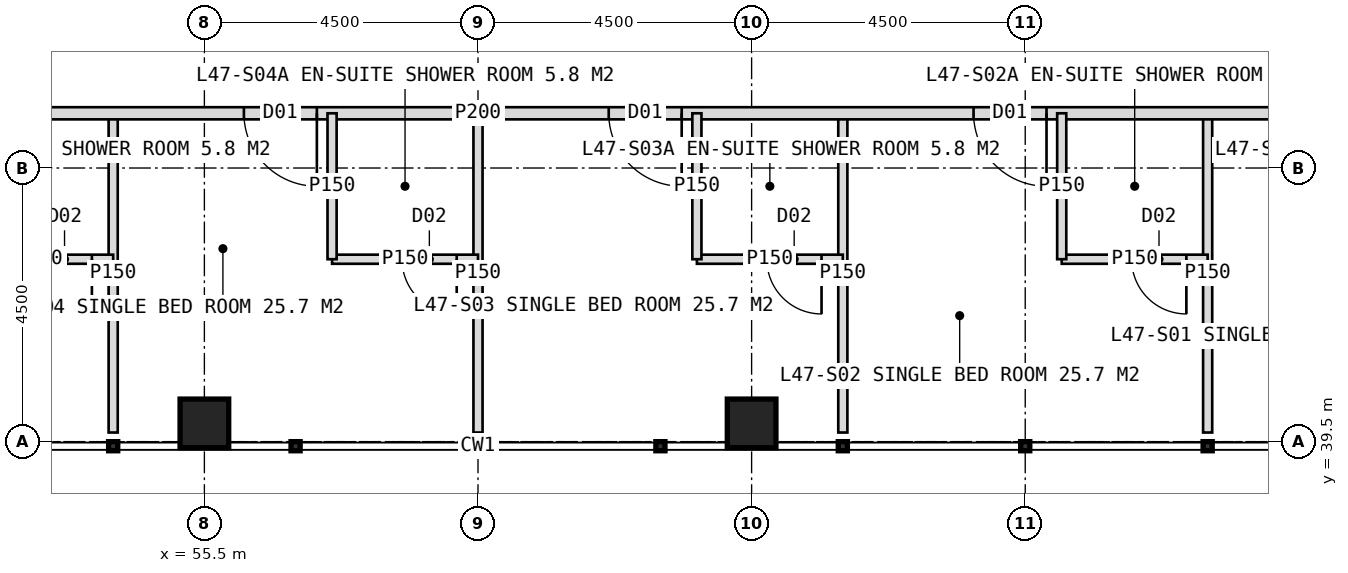
"""IFC4 building model, lengths in metres.
Left out: names, types, materials, properties, quantities, classifications, styles, units other than length and angle.
Written with IfcOpenShell. Run it as: python <this file> out.ifc"""

import sys

from ifc_helpers import new_model, si_unit, direction, frame, frame_2d, origin, origin_2d, place, context, subcontext, project, spatial, rectangle, hollow_rectangle, extrude, element, fill, save


model = new_model("IFC4")
c1 = context("Model", 3, precision=1e-05, world=origin(), true_north=direction((0.0, 1.0)))
c2 = subcontext(c1, "Body", "Model", "MODEL_VIEW")
j1 = project(units=[si_unit("LENGTHUNIT", "METRE"), si_unit("PLANEANGLEUNIT", "RADIAN")], contexts=[c1])
p1 = place(None, origin())
s1 = spatial("IfcSite", under=j1, at=p1, CompositionType="ELEMENT")
p2 = place(p1, origin())
s2 = spatial("IfcBuilding", under=s1, at=p2, CompositionType="ELEMENT")
p3 = place(p2, frame((0.0, 0.0, 197.0)))
s3 = spatial("IfcBuildingStorey", under=s2, at=p3, CompositionType="ELEMENT", Elevation=197.0)
for number, where, z_axis, x_axis in (
    (1, (55.5, 39.8, 0.0), (0.0, 0.0, 1.0), (1.0, 0.0, 0.0)),
    (2, (64.5, 39.8, 0.0), (0.0, 0.0, 1.0), (1.0, 0.0, 0.0)),
):
    element("IfcColumn", number, at=place(p3, frame(where, z_axis=z_axis, x_axis=x_axis)), inside=s3, PredefinedType="COLUMN", context=c2, shape_type="SweptSolid", body=[
        extrude(hollow_rectangle(XDim=0.8, YDim=0.8, WallThickness=0.08, at=origin_2d()), origin(), (0.0, 0.0, 1.0), 4.0),
    ])
for number, where, z_axis, x_axis in (
    (3, (72.0, 44.9, 0.0), (0.0, 0.0, 1.0), (0.0, -1.0, 0.0)),
    (4, (66.0, 44.9, 0.0), (0.0, 0.0, 1.0), (0.0, -1.0, 0.0)),
):
    element("IfcWall", number, at=place(p3, frame(where, z_axis=z_axis, x_axis=x_axis)), inside=s3, PredefinedType="PARTITIONING", context=c2, shape_type="SweptSolid", body=[
        extrude(rectangle(XDim=5.25, YDim=0.15, at=frame_2d((2.625, 0.0))), origin(), (0.0, 0.0, 1.0), 3.75),
    ])
p4 = place(p3, frame((60.0, 44.9, 0.0), z_axis=(0.0, 0.0, 1.0), x_axis=(0.0, -1.0, 0.0)))
e5 = element("IfcWall", 5, at=p4, inside=s3, PredefinedType="PARTITIONING", context=c2, shape_type="SweptSolid", body=[
    extrude(rectangle(XDim=5.25, YDim=0.15, at=frame_2d((2.625, 0.0))), origin(), (0.0, 0.0, 1.0), 2.95),
])
p5 = place(p3, frame((54.0, 44.9, 0.0), z_axis=(0.0, 0.0, 1.0), x_axis=(0.0, -1.0, 0.0)))
e6 = element("IfcWall", 6, at=p5, inside=s3, PredefinedType="PARTITIONING", context=c2, shape_type="SweptSolid", body=[
    extrude(rectangle(XDim=5.25, YDim=0.15, at=frame_2d((2.625, 0.0))), origin(), (0.0, 0.0, 1.0), 3.75),
])
p6 = place(p3, frame((77.1, 44.9, 0.0), z_axis=(0.0, 0.0, 1.0), x_axis=(-1.0, 0.0, 0.0)))
e7 = element("IfcWall", 7, at=p6, inside=s3, PredefinedType="PARTITIONING", context=c2, shape_type="SweptSolid", body=[
    extrude(rectangle(XDim=34.2, YDim=0.2, at=frame_2d((17.1, 0.0))), origin(), (0.0, 0.0, 1.0), 3.75),
])
p7 = place(p6, frame((2.65, 0.0, 0.0)))
e8 = element("IfcOpeningElement", 8, at=p7, cuts=e7, PredefinedType="OPENING", context=c2, shape_type="SweptSolid", body=[
    extrude(rectangle(XDim=1.2, YDim=2.2, at=frame_2d((0.6, 1.1))), frame((0.0, 0.11, 0.0), z_axis=(0.0, -1.0, 0.0), x_axis=(1.0, 0.0, 0.0)), (0.0, 0.0, 1.0), 0.22),
])
p8 = place(p6, frame((7.75, 0.0, 0.0)))
e9 = element("IfcOpeningElement", 9, at=p8, cuts=e7, PredefinedType="OPENING", context=c2, shape_type="SweptSolid", body=[
    extrude(rectangle(XDim=1.2, YDim=2.2, at=frame_2d((0.6, 1.1))), frame((0.0, 0.11, 0.0), z_axis=(0.0, -1.0, 0.0), x_axis=(1.0, 0.0, 0.0)), (0.0, 0.0, 1.0), 0.22),
])
p9 = place(p6, frame((13.75, 0.0, 0.0)))
e10 = element("IfcOpeningElement", 10, at=p9, cuts=e7, PredefinedType="OPENING", context=c2, shape_type="SweptSolid", body=[
    extrude(rectangle(XDim=1.2, YDim=2.2, at=frame_2d((0.6, 1.1))), frame((0.0, 0.11, 0.0), z_axis=(0.0, -1.0, 0.0), x_axis=(1.0, 0.0, 0.0)), (0.0, 0.0, 1.0), 0.22),
])
p10 = place(p6, frame((19.75, 0.0, 0.0)))
e11 = element("IfcOpeningElement", 11, at=p10, cuts=e7, PredefinedType="OPENING", context=c2, shape_type="SweptSolid", body=[
    extrude(rectangle(XDim=1.2, YDim=2.2, at=frame_2d((0.6, 1.1))), frame((0.0, 0.11, 0.0), z_axis=(0.0, -1.0, 0.0), x_axis=(1.0, 0.0, 0.0)), (0.0, 0.0, 1.0), 0.22),
])
p11 = place(p6, frame((25.75, 0.0, 0.0)))
e12 = element("IfcOpeningElement", 12, at=p11, cuts=e7, PredefinedType="OPENING", context=c2, shape_type="SweptSolid", body=[
    extrude(rectangle(XDim=1.2, YDim=2.2, at=frame_2d((0.6, 1.1))), frame((0.0, 0.11, 0.0), z_axis=(0.0, -1.0, 0.0), x_axis=(1.0, 0.0, 0.0)), (0.0, 0.0, 1.0), 0.22),
])
p12 = place(p3, frame((72.0, 42.5, 0.0), z_axis=(0.0, 0.0, 1.0), x_axis=(-1.0, 0.0, 0.0)))
e13 = element("IfcWall", 13, at=p12, inside=s3, PredefinedType="PARTITIONING", context=c2, shape_type="SweptSolid", body=[
    extrude(rectangle(XDim=2.4, YDim=0.15, at=frame_2d((1.2, 0.0))), origin(), (0.0, 0.0, 1.0), 3.75),
])
p13 = place(p12, frame((0.35, 0.0, 0.0)))
e14 = element("IfcOpeningElement", 14, at=p13, cuts=e13, PredefinedType="OPENING", context=c2, shape_type="SweptSolid", body=[
    extrude(rectangle(XDim=0.9, YDim=2.1, at=frame_2d((0.45, 1.05))), frame((0.0, 0.085, 0.0), z_axis=(0.0, -1.0, 0.0), x_axis=(1.0, 0.0, 0.0)), (0.0, 0.0, 1.0), 0.17),
])
p14 = place(p3, frame((69.6, 44.9, 0.0), z_axis=(0.0, 0.0, 1.0), x_axis=(0.0, -1.0, 0.0)))
e15 = element("IfcWall", 15, at=p14, inside=s3, PredefinedType="PARTITIONING", context=c2, shape_type="SweptSolid", body=[
    extrude(rectangle(XDim=2.4, YDim=0.15, at=frame_2d((1.2, 0.0))), origin(), (0.0, 0.0, 1.0), 3.75),
])
p15 = place(p3, frame((66.0, 42.5, 0.0), z_axis=(0.0, 0.0, 1.0), x_axis=(-1.0, 0.0, 0.0)))
e16 = element("IfcWall", 16, at=p15, inside=s3, PredefinedType="PARTITIONING", context=c2, shape_type="SweptSolid", body=[
    extrude(rectangle(XDim=2.4, YDim=0.15, at=frame_2d((1.2, 0.0))), origin(), (0.0, 0.0, 1.0), 3.75),
])
p16 = place(p15, frame((0.35, 0.0, 0.0)))
e17 = element("IfcOpeningElement", 17, at=p16, cuts=e16, PredefinedType="OPENING", context=c2, shape_type="SweptSolid", body=[
    extrude(rectangle(XDim=0.9, YDim=2.1, at=frame_2d((0.45, 1.05))), frame((0.0, 0.085, 0.0), z_axis=(0.0, -1.0, 0.0), x_axis=(1.0, 0.0, 0.0)), (0.0, 0.0, 1.0), 0.17),
])
p17 = place(p3, frame((63.6, 44.9, 0.0), z_axis=(0.0, 0.0, 1.0), x_axis=(0.0, -1.0, 0.0)))
e18 = element("IfcWall", 18, at=p17, inside=s3, PredefinedType="PARTITIONING", context=c2, shape_type="SweptSolid", body=[
    extrude(rectangle(XDim=2.4, YDim=0.15, at=frame_2d((1.2, 0.0))), origin(), (0.0, 0.0, 1.0), 3.75),
])
p18 = place(p3, frame((60.0, 42.5, 0.0), z_axis=(0.0, 0.0, 1.0), x_axis=(-1.0, 0.0, 0.0)))
e19 = element("IfcWall", 19, at=p18, inside=s3, PredefinedType="PARTITIONING", context=c2, shape_type="SweptSolid", body=[
    extrude(rectangle(XDim=2.4, YDim=0.15, at=frame_2d((1.2, 0.0))), origin(), (0.0, 0.0, 1.0), 3.75),
])
p19 = place(p18, frame((0.35, 0.0, 0.0)))
e20 = element("IfcOpeningElement", 20, at=p19, cuts=e19, PredefinedType="OPENING", context=c2, shape_type="SweptSolid", body=[
    extrude(rectangle(XDim=0.9, YDim=2.1, at=frame_2d((0.45, 1.05))), frame((0.0, 0.085, 0.0), z_axis=(0.0, -1.0, 0.0), x_axis=(1.0, 0.0, 0.0)), (0.0, 0.0, 1.0), 0.17),
])
p20 = place(p3, frame((57.6, 44.9, 0.0), z_axis=(0.0, 0.0, 1.0), x_axis=(0.0, -1.0, 0.0)))
e21 = element("IfcWall", 21, at=p20, inside=s3, PredefinedType="PARTITIONING", context=c2, shape_type="SweptSolid", body=[
    extrude(rectangle(XDim=2.4, YDim=0.15, at=frame_2d((1.2, 0.0))), origin(), (0.0, 0.0, 1.0), 3.75),
])
p21 = place(p3, frame((54.0, 42.5, 0.0), z_axis=(0.0, 0.0, 1.0), x_axis=(-1.0, 0.0, 0.0)))
e22 = element("IfcWall", 22, at=p21, inside=s3, PredefinedType="PARTITIONING", context=c2, shape_type="SweptSolid", body=[
    extrude(rectangle(XDim=2.4, YDim=0.15, at=frame_2d((1.2, 0.0))), origin(), (0.0, 0.0, 1.0), 3.75),
])
p22 = place(p21, frame((0.35, 0.0, 0.0)))
e23 = element("IfcOpeningElement", 23, at=p22, cuts=e22, PredefinedType="OPENING", context=c2, shape_type="SweptSolid", body=[
    extrude(rectangle(XDim=0.9, YDim=2.1, at=frame_2d((0.45, 1.05))), frame((0.0, 0.085, 0.0), z_axis=(0.0, -1.0, 0.0), x_axis=(1.0, 0.0, 0.0)), (0.0, 0.0, 1.0), 0.17),
])
p23 = place(p8, origin())
e24 = element("IfcDoor", 24, at=p23, inside=s3, OperationType="SINGLE_SWING_LEFT", PredefinedType="DOOR", context=c2, shape_type="SweptSolid", body=[
    extrude(rectangle(XDim=1.2, YDim=2.2, at=frame_2d((0.6, 1.1))), frame((0.0, 0.025, 0.0), z_axis=(0.0, -1.0, 0.0), x_axis=(1.0, 0.0, 0.0)), (0.0, 0.0, 1.0), 0.05),
])
fill(e9, e24)
p24 = place(p13, origin())
e25 = element("IfcDoor", 25, at=p24, inside=s3, OperationType="SINGLE_SWING_LEFT", PredefinedType="DOOR", context=c2, shape_type="SweptSolid", body=[
    extrude(rectangle(XDim=0.9, YDim=2.1, at=frame_2d((0.45, 1.05))), frame((0.0, 0.025, 0.0), z_axis=(0.0, -1.0, 0.0), x_axis=(1.0, 0.0, 0.0)), (0.0, 0.0, 1.0), 0.05),
])
fill(e14, e25)
p25 = place(p9, origin())
e26 = element("IfcDoor", 26, at=p25, inside=s3, OperationType="SINGLE_SWING_LEFT", PredefinedType="DOOR", context=c2, shape_type="SweptSolid", body=[
    extrude(rectangle(XDim=1.2, YDim=2.2, at=frame_2d((0.6, 1.1))), frame((0.0, 0.025, 0.0), z_axis=(0.0, -1.0, 0.0), x_axis=(1.0, 0.0, 0.0)), (0.0, 0.0, 1.0), 0.05),
])
fill(e10, e26)
p26 = place(p16, origin())
e27 = element("IfcDoor", 27, at=p26, inside=s3, OperationType="SINGLE_SWING_LEFT", PredefinedType="DOOR", context=c2, shape_type="SweptSolid", body=[
    extrude(rectangle(XDim=0.9, YDim=2.1, at=frame_2d((0.45, 1.05))), frame((0.0, 0.025, 0.0), z_axis=(0.0, -1.0, 0.0), x_axis=(1.0, 0.0, 0.0)), (0.0, 0.0, 1.0), 0.05),
])
fill(e17, e27)
p27 = place(p10, origin())
e28 = element("IfcDoor", 28, at=p27, inside=s3, OperationType="SINGLE_SWING_LEFT", PredefinedType="DOOR", context=c2, shape_type="SweptSolid", body=[
    extrude(rectangle(XDim=1.2, YDim=2.2, at=frame_2d((0.6, 1.1))), frame((0.0, 0.025, 0.0), z_axis=(0.0, -1.0, 0.0), x_axis=(1.0, 0.0, 0.0)), (0.0, 0.0, 1.0), 0.05),
])
fill(e11, e28)
p28 = place(p19, origin())
e29 = element("IfcDoor", 29, at=p28, inside=s3, OperationType="SINGLE_SWING_LEFT", PredefinedType="DOOR", context=c2, shape_type="SweptSolid", body=[
    extrude(rectangle(XDim=0.9, YDim=2.1, at=frame_2d((0.45, 1.05))), frame((0.0, 0.025, 0.0), z_axis=(0.0, -1.0, 0.0), x_axis=(1.0, 0.0, 0.0)), (0.0, 0.0, 1.0), 0.05),
])
fill(e20, e29)
p29 = place(p22, origin())
e30 = element("IfcDoor", 30, at=p29, inside=s3, OperationType="SINGLE_SWING_LEFT", PredefinedType="DOOR", context=c2, shape_type="SweptSolid", body=[
    extrude(rectangle(XDim=0.9, YDim=2.1, at=frame_2d((0.45, 1.05))), frame((0.0, 0.025, 0.0), z_axis=(0.0, -1.0, 0.0), x_axis=(1.0, 0.0, 0.0)), (0.0, 0.0, 1.0), 0.05),
])
fill(e23, e30)
save(model, sys.argv[1])
